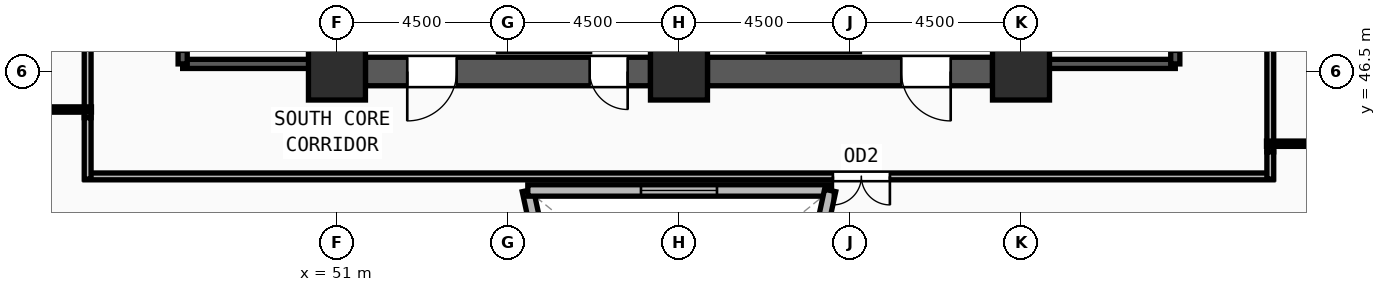
"""IFC4 building model, lengths in metres.
Left out: names, types, materials, properties, quantities, classifications, styles, units other than length and angle.
Written with IfcOpenShell. Run it as: python <this file> out.ifc"""

import sys

from ifc_helpers import new_model, si_unit, direction, frame, frame_2d, origin, origin_2d, place, context, subcontext, project, spatial, rectangle, extrude, source, transform, mapped, element, fill, save


model = new_model("IFC4")
c1 = context("Model", 3, precision=1e-05, world=origin(), true_north=direction((0.0, 1.0)))
c2 = subcontext(c1, "Body", "Model", "MODEL_VIEW")
j1 = project(units=[si_unit("LENGTHUNIT", "METRE"), si_unit("PLANEANGLEUNIT", "RADIAN")], contexts=[c1])
p1 = place(None, origin())
s1 = spatial("IfcSite", under=j1, at=p1, CompositionType="ELEMENT")
p2 = place(p1, origin())
s2 = spatial("IfcBuilding", under=s1, at=p2, CompositionType="ELEMENT")
p3 = place(p2, frame((0.0, 0.0, 155.25)))
s3 = spatial("IfcBuildingStorey", under=s2, at=p3, CompositionType="ELEMENT", Elevation=155.25)
m1 = source(origin(), c2, "Body", "SweptSolid", [
    extrude(rectangle(XDim=1.5, YDim=1.5, at=origin_2d()), origin(), (0.0, 0.0, 1.0), 3.75),
])
for number, where, z_axis, x_axis in (
    (1, (51.0, 46.5, 0.0), (0.0, 0.0, 1.0), (1.0, 0.0, 0.0)),
    (2, (60.0, 46.5, 0.0), (0.0, 0.0, 1.0), (1.0, 0.0, 0.0)),
    (3, (69.0, 46.5, 0.0), (0.0, 0.0, 1.0), (1.0, 0.0, 0.0)),
):
    element("IfcColumn", number, at=place(p3, frame(where, z_axis=z_axis, x_axis=x_axis)), inside=s3, PredefinedType="COLUMN", context=c2, shape_type="MappedRepresentation", body=[
        mapped(m1, transform((0.0, 0.0, 0.0), x_axis=(1.0, 0.0, 0.0), y_axis=(0.0, 1.0, 0.0), z_axis=(0.0, 0.0, 1.0), scale=1.0)),
    ])
p4 = place(p3, frame((66.127, 17.359, 0.0), z_axis=(0.0, 0.0, 1.0), x_axis=(0.550882826914, 0.834582596878, 0.0)))
e4 = element("IfcWall", 4, at=p4, inside=s3, PredefinedType="SOLIDWALL", context=c2, shape_type="SweptSolid", body=[
    extrude(rectangle(XDim=30.731, YDim=0.42, at=frame_2d((15.365, 0.0))), origin(), (0.0, 0.0, 1.0), 3.57),
])
m2 = source(origin(), c2, "Body", "SweptSolid", [
    extrude(rectangle(XDim=1.65, YDim=1.95, at=frame_2d((0.825, 0.975))), frame((0.0, 0.22, 0.0), z_axis=(0.0, -1.0, 0.0), x_axis=(1.0, 0.0, 0.0)), (0.0, 0.0, 1.0), 0.44),
])
p5 = place(p4, frame((6.858, 0.0, 0.55)))
e5 = element("IfcOpeningElement", 5, at=p5, cuts=e4, PredefinedType="OPENING", context=c2, shape_type="MappedRepresentation", body=[
    mapped(m2, transform((0.0, 0.0, 0.0), x_axis=(1.0, 0.0, 0.0), y_axis=(0.0, 1.0, 0.0), z_axis=(0.0, 0.0, 1.0), scale=1.0)),
])
p6 = place(p4, frame((14.54, 0.0, 0.55)))
e6 = element("IfcOpeningElement", 6, at=p6, cuts=e4, PredefinedType="OPENING", context=c2, shape_type="MappedRepresentation", body=[
    mapped(m2, transform((0.0, 0.0, 0.0), x_axis=(1.0, 0.0, 0.0), y_axis=(0.0, 1.0, 0.0), z_axis=(0.0, 0.0, 1.0), scale=1.0)),
])
p7 = place(p4, frame((22.223, 0.0, 0.55)))
e7 = element("IfcOpeningElement", 7, at=p7, cuts=e4, PredefinedType="OPENING", context=c2, shape_type="MappedRepresentation", body=[
    mapped(m2, transform((0.0, 0.0, 0.0), x_axis=(1.0, 0.0, 0.0), y_axis=(0.0, 1.0, 0.0), z_axis=(0.0, 0.0, 1.0), scale=1.0)),
])
p8 = place(p3, frame((68.25, 46.5, 0.0), z_axis=(0.0, 0.0, 1.0), x_axis=(-1.0, 0.0, 0.0)))
e8 = element("IfcWall", 8, at=p8, inside=s3, PredefinedType="SHEAR", context=c2, shape_type="SweptSolid", body=[
    extrude(rectangle(XDim=7.5, YDim=0.75, at=frame_2d((3.75, 0.0))), origin(), (0.0, 0.0, 1.0), 3.57),
])
m3 = source(origin(), c2, "Body", "SweptSolid", [
    extrude(rectangle(XDim=1.3, YDim=2.2, at=frame_2d((0.65, 1.1))), frame((0.0, 0.385, 0.0), z_axis=(0.0, -1.0, 0.0), x_axis=(1.0, 0.0, 0.0)), (0.0, 0.0, 1.0), 0.77),
])
p9 = place(p8, frame((1.1, 0.0, 0.0)))
e9 = element("IfcOpeningElement", 9, at=p9, cuts=e8, PredefinedType="OPENING", context=c2, shape_type="MappedRepresentation", body=[
    mapped(m3, transform((0.0, 0.0, 0.0), x_axis=(1.0, 0.0, 0.0), y_axis=(0.0, 1.0, 0.0), z_axis=(0.0, 0.0, 1.0), scale=1.0)),
])
p10 = place(p3, frame((59.25, 46.5, 0.0), z_axis=(0.0, 0.0, 1.0), x_axis=(-1.0, 0.0, 0.0)))
e10 = element("IfcWall", 10, at=p10, inside=s3, PredefinedType="SHEAR", context=c2, shape_type="SweptSolid", body=[
    extrude(rectangle(XDim=7.5, YDim=0.75, at=frame_2d((3.75, 0.0))), origin(), (0.0, 0.0, 1.0), 3.57),
])
p11 = place(p10, frame((5.1, 0.0, 0.0)))
e11 = element("IfcOpeningElement", 11, at=p11, cuts=e10, PredefinedType="OPENING", context=c2, shape_type="MappedRepresentation", body=[
    mapped(m3, transform((0.0, 0.0, 0.0), x_axis=(1.0, 0.0, 0.0), y_axis=(0.0, 1.0, 0.0), z_axis=(0.0, 0.0, 1.0), scale=1.0)),
])
m4 = source(origin(), c2, "Body", "SweptSolid", [
    extrude(rectangle(XDim=1.0, YDim=2.2, at=frame_2d((0.5, 1.1))), frame((0.0, 0.385, 0.0), z_axis=(0.0, -1.0, 0.0), x_axis=(1.0, 0.0, 0.0)), (0.0, 0.0, 1.0), 0.77),
])
p12 = place(p10, frame((0.6, 0.0, 0.0)))
e12 = element("IfcOpeningElement", 12, at=p12, cuts=e10, PredefinedType="OPENING", context=c2, shape_type="MappedRepresentation", body=[
    mapped(m4, transform((0.0, 0.0, 0.0), x_axis=(1.0, 0.0, 0.0), y_axis=(0.0, 1.0, 0.0), z_axis=(0.0, 0.0, 1.0), scale=1.0)),
])
p13 = place(p3, frame((46.94, 46.7, 0.0), z_axis=(0.0, 0.0, 1.0), x_axis=(1.0, 0.0, 0.0)))
e13 = element("IfcWall", 13, at=p13, inside=s3, PredefinedType="SOLIDWALL", context=c2, shape_type="SweptSolid", body=[
    extrude(rectangle(XDim=3.44, YDim=0.24, at=frame_2d((1.72, 0.0))), origin(), (0.0, 0.0, 1.0), 3.57),
])
p14 = place(p3, frame((50.38, 46.7, 0.0), z_axis=(0.0, 0.0, 1.0), x_axis=(0.0, 1.0, 0.0)))
e14 = element("IfcWall", 14, at=p14, inside=s3, PredefinedType="SOLIDWALL", context=c2, shape_type="SweptSolid", body=[
    extrude(rectangle(XDim=7.82, YDim=0.24, at=frame_2d((3.91, 0.0))), origin(), (0.0, 0.0, 1.0), 3.57),
])
p15 = place(p3, frame((46.94, 54.52, 0.0), z_axis=(0.0, 0.0, 1.0), x_axis=(0.0, -1.0, 0.0)))
e15 = element("IfcWall", 15, at=p15, inside=s3, PredefinedType="SOLIDWALL", context=c2, shape_type="SweptSolid", body=[
    extrude(rectangle(XDim=7.82, YDim=0.24, at=frame_2d((3.91, 0.0))), origin(), (0.0, 0.0, 1.0), 3.57),
])
m5 = source(origin(), c2, "Body", "SweptSolid", [
    extrude(rectangle(XDim=1.2, YDim=2.2, at=frame_2d((0.6, 1.1))), frame((0.0, 0.13, 0.0), z_axis=(0.0, -1.0, 0.0), x_axis=(1.0, 0.0, 0.0)), (0.0, 0.0, 1.0), 0.26),
])
p16 = place(p15, frame((6.3, 0.0, 0.0)))
e16 = element("IfcOpeningElement", 16, at=p16, cuts=e15, PredefinedType="OPENING", context=c2, shape_type="MappedRepresentation", body=[
    mapped(m5, transform((0.0, 0.0, 0.0), x_axis=(1.0, 0.0, 0.0), y_axis=(0.0, 1.0, 0.0), z_axis=(0.0, 0.0, 1.0), scale=1.0)),
])
p17 = place(p3, frame((69.62, 46.7, 0.0), z_axis=(0.0, 0.0, 1.0), x_axis=(1.0, 0.0, 0.0)))
e17 = element("IfcWall", 17, at=p17, inside=s3, PredefinedType="SOLIDWALL", context=c2, shape_type="SweptSolid", body=[
    extrude(rectangle(XDim=3.44, YDim=0.24, at=frame_2d((1.72, 0.0))), origin(), (0.0, 0.0, 1.0), 3.57),
])
p18 = place(p3, frame((73.06, 46.7, 0.0), z_axis=(0.0, 0.0, 1.0), x_axis=(0.0, 1.0, 0.0)))
e18 = element("IfcWall", 18, at=p18, inside=s3, PredefinedType="SOLIDWALL", context=c2, shape_type="SweptSolid", body=[
    extrude(rectangle(XDim=7.82, YDim=0.24, at=frame_2d((3.91, 0.0))), origin(), (0.0, 0.0, 1.0), 3.57),
])
p19 = place(p18, frame((0.32, 0.0, 0.0)))
e19 = element("IfcOpeningElement", 19, at=p19, cuts=e18, PredefinedType="OPENING", context=c2, shape_type="MappedRepresentation", body=[
    mapped(m5, transform((0.0, 0.0, 0.0), x_axis=(1.0, 0.0, 0.0), y_axis=(0.0, 1.0, 0.0), z_axis=(0.0, 0.0, 1.0), scale=1.0)),
])
p20 = place(p3, frame((69.62, 54.52, 0.0), z_axis=(0.0, 0.0, 1.0), x_axis=(0.0, -1.0, 0.0)))
e20 = element("IfcWall", 20, at=p20, inside=s3, PredefinedType="SOLIDWALL", context=c2, shape_type="SweptSolid", body=[
    extrude(rectangle(XDim=7.82, YDim=0.24, at=frame_2d((3.91, 0.0))), origin(), (0.0, 0.0, 1.0), 3.57),
])
p21 = place(p3, frame((57.414, 36.93, 0.0), z_axis=(0.0, 0.0, 1.0), x_axis=(-0.211277302898, 0.977426161549, 0.0)))
e21 = element("IfcWall", 21, at=p21, inside=s3, PredefinedType="SOLIDWALL", context=c2, shape_type="SweptSolid", body=[
    extrude(rectangle(XDim=6.589, YDim=0.3, at=frame_2d((3.294, 0.0))), origin(), (0.0, 0.0, 1.0), 3.57),
])
m6 = source(origin(), c2, "Body", "SweptSolid", [
    extrude(rectangle(XDim=2.0, YDim=1.9, at=frame_2d((1.0, 0.95))), frame((0.0, 0.16, 0.0), z_axis=(0.0, -1.0, 0.0), x_axis=(1.0, 0.0, 0.0)), (0.0, 0.0, 1.0), 0.32),
])
p22 = place(p21, frame((2.294, 0.0, 0.55)))
e22 = element("IfcOpeningElement", 22, at=p22, cuts=e21, PredefinedType="OPENING", context=c2, shape_type="MappedRepresentation", body=[
    mapped(m6, transform((0.0, 0.0, 0.0), x_axis=(1.0, 0.0, 0.0), y_axis=(0.0, 1.0, 0.0), z_axis=(0.0, 0.0, 1.0), scale=1.0)),
])
p23 = place(p3, frame((56.022, 43.37, 0.0), z_axis=(0.0, 0.0, 1.0), x_axis=(1.0, 0.0, 0.0)))
e23 = element("IfcWall", 23, at=p23, inside=s3, PredefinedType="SOLIDWALL", context=c2, shape_type="SweptSolid", body=[
    extrude(rectangle(XDim=7.956, YDim=0.3, at=frame_2d((3.978, 0.0))), origin(), (0.0, 0.0, 1.0), 3.57),
])
p24 = place(p23, frame((2.978, 0.0, 0.55)))
e24 = element("IfcOpeningElement", 24, at=p24, cuts=e23, PredefinedType="OPENING", context=c2, shape_type="MappedRepresentation", body=[
    mapped(m6, transform((0.0, 0.0, 0.0), x_axis=(1.0, 0.0, 0.0), y_axis=(0.0, 1.0, 0.0), z_axis=(0.0, 0.0, 1.0), scale=1.0)),
])
p25 = place(p3, frame((63.978, 43.37, 0.0), z_axis=(0.0, 0.0, 1.0), x_axis=(-0.211277302898, -0.977426161549, 0.0)))
e25 = element("IfcWall", 25, at=p25, inside=s3, PredefinedType="SOLIDWALL", context=c2, shape_type="SweptSolid", body=[
    extrude(rectangle(XDim=6.589, YDim=0.3, at=frame_2d((3.294, 0.0))), origin(), (0.0, 0.0, 1.0), 3.57),
])
p26 = place(p25, frame((2.294, 0.0, 0.55)))
e26 = element("IfcOpeningElement", 26, at=p26, cuts=e25, PredefinedType="OPENING", context=c2, shape_type="MappedRepresentation", body=[
    mapped(m6, transform((0.0, 0.0, 0.0), x_axis=(1.0, 0.0, 0.0), y_axis=(0.0, 1.0, 0.0), z_axis=(0.0, 0.0, 1.0), scale=1.0)),
])
p27 = place(p3, frame((75.63, 43.74, 0.0), z_axis=(0.0, 0.0, 1.0), x_axis=(-1.0, 0.0, 0.0)))
e27 = element("IfcWall", 27, at=p27, inside=s3, PredefinedType="PARTITIONING", context=c2, shape_type="SweptSolid", body=[
    extrude(rectangle(XDim=31.26, YDim=0.18, at=frame_2d((15.63, 0.0))), origin(), (0.0, 0.0, 1.0), 3.57),
])
m7 = source(origin(), c2, "Body", "SweptSolid", [
    extrude(rectangle(XDim=1.5, YDim=2.2, at=frame_2d((0.75, 1.1))), frame((0.0, 0.1, 0.0), z_axis=(0.0, -1.0, 0.0), x_axis=(1.0, 0.0, 0.0)), (0.0, 0.0, 1.0), 0.2),
])
p28 = place(p27, frame((10.08, 0.0, 0.0)))
e28 = element("IfcOpeningElement", 28, at=p28, cuts=e27, PredefinedType="OPENING", context=c2, shape_type="MappedRepresentation", body=[
    mapped(m7, transform((0.0, 0.0, 0.0), x_axis=(1.0, 0.0, 0.0), y_axis=(0.0, 1.0, 0.0), z_axis=(0.0, 0.0, 1.0), scale=1.0)),
])
p29 = place(p3, frame((75.56, 51.715, 0.0), z_axis=(0.0, 0.0, 1.0), x_axis=(0.0, -1.0, 0.0)))
e29 = element("IfcWall", 29, at=p29, inside=s3, PredefinedType="PARTITIONING", context=c2, shape_type="SweptSolid", body=[
    extrude(rectangle(XDim=7.33, YDim=0.18, at=frame_2d((3.665, 0.0))), origin(), (0.0, 0.0, 1.0), 3.155),
])
m8 = source(origin(), c2, "Body", "SweptSolid", [
    extrude(rectangle(XDim=1.0, YDim=2.2, at=frame_2d((0.5, 1.1))), frame((0.0, 0.1, 0.0), z_axis=(0.0, -1.0, 0.0), x_axis=(1.0, 0.0, 0.0)), (0.0, 0.0, 1.0), 0.2),
])
p30 = place(p29, frame((3.165, 0.0, 0.0)))
e30 = element("IfcOpeningElement", 30, at=p30, cuts=e29, PredefinedType="OPENING", context=c2, shape_type="MappedRepresentation", body=[
    mapped(m8, transform((0.0, 0.0, 0.0), x_axis=(1.0, 0.0, 0.0), y_axis=(0.0, 1.0, 0.0), z_axis=(0.0, 0.0, 1.0), scale=1.0)),
])
p31 = place(p3, frame((44.44, 45.285, 0.0), z_axis=(0.0, 0.0, 1.0), x_axis=(0.0, 1.0, 0.0)))
e31 = element("IfcWall", 31, at=p31, inside=s3, PredefinedType="PARTITIONING", context=c2, shape_type="SweptSolid", body=[
    extrude(rectangle(XDim=8.725, YDim=0.18, at=frame_2d((4.363, 0.0))), origin(), (0.0, 0.0, 1.0), 3.57),
])
p32 = place(p3, frame((44.44, 43.67, 0.0), z_axis=(0.0, 0.0, 1.0), x_axis=(0.0, 1.0, 0.0)))
e32 = element("IfcWall", 32, at=p32, inside=s3, PredefinedType="PARTITIONING", context=c2, shape_type="SweptSolid", body=[
    extrude(rectangle(XDim=1.615, YDim=0.18, at=frame_2d((0.808, 0.0))), origin(), (0.0, 0.0, 1.0), 3.57),
])
p33 = place(p3, frame((75.56, 44.385, 0.0), z_axis=(0.0, 0.0, 1.0), x_axis=(0.0, -1.0, 0.0)))
e33 = element("IfcWall", 33, at=p33, inside=s3, PredefinedType="PARTITIONING", context=c2, shape_type="SweptSolid", body=[
    extrude(rectangle(XDim=0.715, YDim=0.18, at=frame_2d((0.357, 0.0))), origin(), (0.0, 0.0, 1.0), 3.57),
])
p34 = place(p3, frame((44.54, 45.5, 0.0), z_axis=(0.0, 0.0, 1.0), x_axis=(-1.0, 0.0, 0.0)))
e34 = element("IfcWall", 34, at=p34, inside=s3, PredefinedType="PARTITIONING", context=c2, shape_type="SweptSolid", body=[
    extrude(rectangle(XDim=9.279, YDim=0.14, at=frame_2d((4.64, 0.0))), origin(), (0.0, 0.0, 1.0), 3.57),
])
p35 = place(p3, frame((75.46, 44.6, 0.0), z_axis=(0.0, 0.0, 1.0), x_axis=(1.0, 0.0, 0.0)))
e35 = element("IfcWall", 35, at=p35, inside=s3, PredefinedType="PARTITIONING", context=c2, shape_type="SweptSolid", body=[
    extrude(rectangle(XDim=9.171, YDim=0.14, at=frame_2d((4.585, 0.0))), origin(), (0.0, 0.0, 1.0), 3.57),
])
m9 = source(origin(), c2, "Body", "SweptSolid", [
    extrude(rectangle(XDim=1.3, YDim=2.2, at=frame_2d((0.65, 1.1))), frame((0.0, 0.025, 0.0), z_axis=(0.0, -1.0, 0.0), x_axis=(1.0, 0.0, 0.0)), (0.0, 0.0, 1.0), 0.05),
])
p36 = place(p11, origin())
e36 = element("IfcDoor", 36, at=p36, inside=s3, OperationType="SINGLE_SWING_RIGHT", PredefinedType="DOOR", context=c2, shape_type="MappedRepresentation", body=[
    mapped(m9, transform((0.0, 0.0, 0.0), x_axis=(1.0, 0.0, 0.0), y_axis=(0.0, 1.0, 0.0), z_axis=(0.0, 0.0, 1.0), scale=1.0)),
])
fill(e11, e36)
m10 = source(origin(), c2, "Body", "SweptSolid", [
    extrude(rectangle(XDim=1.0, YDim=2.2, at=frame_2d((0.5, 1.1))), frame((0.0, 0.025, 0.0), z_axis=(0.0, -1.0, 0.0), x_axis=(1.0, 0.0, 0.0)), (0.0, 0.0, 1.0), 0.05),
])
p37 = place(p12, origin())
e37 = element("IfcDoor", 37, at=p37, inside=s3, OperationType="SINGLE_SWING_LEFT", PredefinedType="DOOR", context=c2, shape_type="MappedRepresentation", body=[
    mapped(m10, transform((0.0, 0.0, 0.0), x_axis=(1.0, 0.0, 0.0), y_axis=(0.0, 1.0, 0.0), z_axis=(0.0, 0.0, 1.0), scale=1.0)),
])
fill(e12, e37)
p38 = place(p9, origin())
e38 = element("IfcDoor", 38, at=p38, inside=s3, OperationType="SINGLE_SWING_LEFT", PredefinedType="DOOR", context=c2, shape_type="MappedRepresentation", body=[
    mapped(m9, transform((0.0, 0.0, 0.0), x_axis=(1.0, 0.0, 0.0), y_axis=(0.0, 1.0, 0.0), z_axis=(0.0, 0.0, 1.0), scale=1.0)),
])
fill(e9, e38)
m11 = source(origin(), c2, "Body", "SweptSolid", [
    extrude(rectangle(XDim=2.0, YDim=1.9, at=frame_2d((1.0, 0.95))), frame((0.0, 0.03, 0.0), z_axis=(0.0, -1.0, 0.0), x_axis=(1.0, 0.0, 0.0)), (0.0, 0.0, 1.0), 0.06),
])
p39 = place(p24, origin())
e39 = element("IfcWindow", 39, at=p39, inside=s3, PartitioningType="DOUBLE_PANEL_VERTICAL", PredefinedType="WINDOW", context=c2, shape_type="MappedRepresentation", body=[
    mapped(m11, transform((0.0, 0.0, 0.0), x_axis=(1.0, 0.0, 0.0), y_axis=(0.0, 1.0, 0.0), z_axis=(0.0, 0.0, 1.0), scale=1.0)),
])
fill(e24, e39)
m12 = source(origin(), c2, "Body", "SweptSolid", [
    extrude(rectangle(XDim=1.5, YDim=2.2, at=frame_2d((0.75, 1.1))), frame((0.0, 0.025, 0.0), z_axis=(0.0, -1.0, 0.0), x_axis=(1.0, 0.0, 0.0)), (0.0, 0.0, 1.0), 0.05),
])
p40 = place(p28, origin())
e40 = element("IfcDoor", 40, at=p40, inside=s3, OperationType="DOUBLE_DOOR_SINGLE_SWING", PredefinedType="DOOR", context=c2, shape_type="MappedRepresentation", body=[
    mapped(m12, transform((0.0, 0.0, 0.0), x_axis=(1.0, 0.0, 0.0), y_axis=(0.0, 1.0, 0.0), z_axis=(0.0, 0.0, 1.0), scale=1.0)),
])
fill(e28, e40)
save(model, sys.argv[1])
